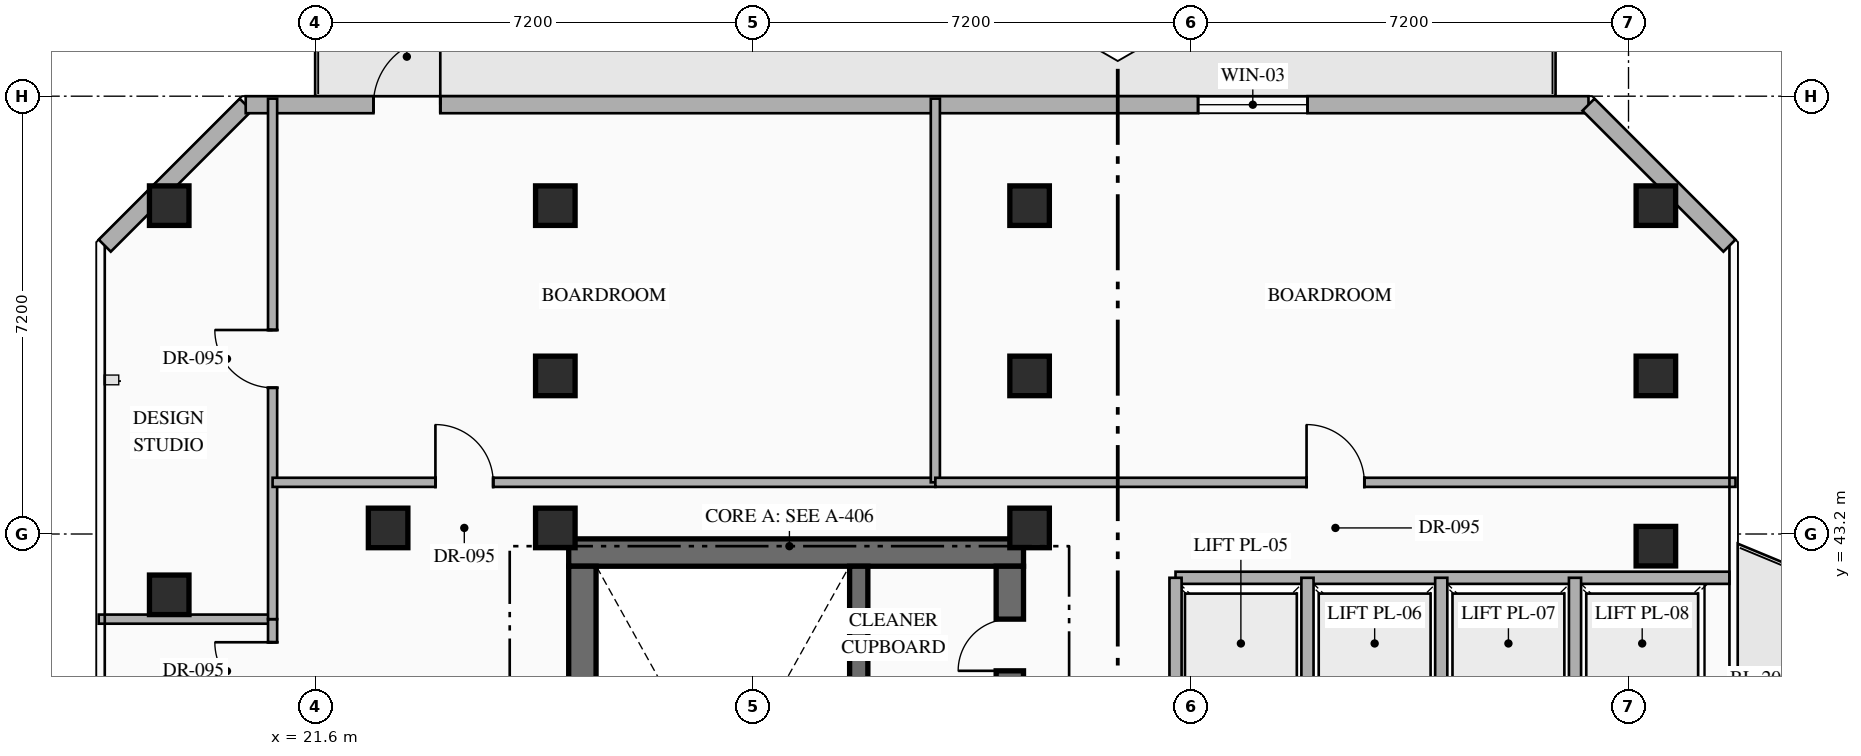
"""IFC4 building model, lengths in metres.
Left out: names, types, materials, properties, quantities, classifications, styles, units other than length and angle.
Written with IfcOpenShell. Run it as: python <this file> out.ifc"""

import sys

from ifc_helpers import new_model, si_unit, direction, frame, frame_2d, origin, origin_2d, place, context, subcontext, project, spatial, rectangle, hollow_rectangle, extrude, element, fill, save


model = new_model("IFC4")
c1 = context("Model", 3, precision=1e-05, world=origin(), true_north=direction((0.0, 1.0)))
c2 = subcontext(c1, "Body", "Model", "MODEL_VIEW")
j1 = project(units=[si_unit("LENGTHUNIT", "METRE"), si_unit("PLANEANGLEUNIT", "RADIAN")], contexts=[c1])
p1 = place(None, origin())
s1 = spatial("IfcSite", under=j1, at=p1, CompositionType="ELEMENT")
p2 = place(p1, origin())
s2 = spatial("IfcBuilding", under=s1, at=p2, CompositionType="ELEMENT")
p3 = place(p2, frame((0.0, 0.0, 243.15)))
s3 = spatial("IfcBuildingStorey", under=s2, at=p3, CompositionType="ELEMENT", Elevation=243.15)
p4 = place(p3, frame((25.77, 42.895, 0.0), z_axis=(0.0, 0.0, 1.0), x_axis=(1.0, 0.0, 0.0)))
e1 = element("IfcWall", 1, at=p4, inside=s3, PredefinedType="SHEAR", context=c2, shape_type="SweptSolid", body=[
    extrude(rectangle(XDim=7.48, YDim=0.45, at=frame_2d((3.74, 0.0))), origin(), (0.0, 0.0, 1.0), 3.6),
])
p5 = place(p3, frame((25.995, 33.19, 0.0), z_axis=(0.0, 0.0, 1.0), x_axis=(0.0, 1.0, 0.0)))
e2 = element("IfcWall", 2, at=p5, inside=s3, PredefinedType="SHEAR", context=c2, shape_type="SweptSolid", body=[
    extrude(rectangle(XDim=9.48, YDim=0.45, at=frame_2d((4.74, 0.0))), origin(), (0.0, 0.0, 1.0), 3.6),
])
p6 = place(p3, frame((33.025, 33.19, 0.0), z_axis=(0.0, 0.0, 1.0), x_axis=(0.0, 1.0, 0.0)))
e3 = element("IfcWall", 3, at=p6, inside=s3, PredefinedType="SHEAR", context=c2, shape_type="SweptSolid", body=[
    extrude(rectangle(XDim=9.48, YDim=0.45, at=frame_2d((4.74, 0.0))), origin(), (0.0, 0.0, 1.0), 3.6),
])
p7 = place(p6, frame((4.71, 0.0, 0.0)))
e4 = element("IfcOpeningElement", 4, at=p7, cuts=e3, PredefinedType="OPENING", context=c2, shape_type="SweptSolid", body=[
    extrude(rectangle(XDim=0.85, YDim=2.08, at=frame_2d((0.425, 1.04))), frame((0.0, 0.235, 0.0), z_axis=(0.0, -1.0, 0.0), x_axis=(1.0, 0.0, 0.0)), (0.0, 0.0, 1.0), 0.47),
])
p8 = place(p6, frame((7.76, 0.0, 0.0)))
e5 = element("IfcOpeningElement", 5, at=p8, cuts=e3, PredefinedType="OPENING", context=c2, shape_type="SweptSolid", body=[
    extrude(rectangle(XDim=0.85, YDim=2.08, at=frame_2d((0.425, 1.04))), frame((0.0, 0.235, 0.0), z_axis=(0.0, -1.0, 0.0), x_axis=(1.0, 0.0, 0.0)), (0.0, 0.0, 1.0), 0.47),
])
p9 = place(p3, frame((30.54, 33.19, 0.0), z_axis=(0.0, 0.0, 1.0), x_axis=(0.0, 1.0, 0.0)))
e6 = element("IfcWall", 6, at=p9, inside=s3, PredefinedType="SHEAR", context=c2, shape_type="SweptSolid", body=[
    extrude(rectangle(XDim=9.48, YDim=0.3, at=frame_2d((4.74, 0.0))), origin(), (0.0, 0.0, 1.0), 3.6),
])
for number, where, z_axis, x_axis in (
    (7, (25.55, 43.3, 0.0), (0.0, 0.0, 1.0), (1.0, 0.0, 0.0)),
    (8, (33.35, 43.3, 0.0), (0.0, 0.0, 1.0), (1.0, 0.0, 0.0)),
    (9, (43.65, 43.0, 0.0), (0.0, 0.0, 1.0), (1.0, 0.0, 0.0)),
    (10, (25.55, 45.8, 0.0), (0.0, 0.0, 1.0), (1.0, 0.0, 0.0)),
    (11, (33.35, 45.8, 0.0), (0.0, 0.0, 1.0), (1.0, 0.0, 0.0)),
    (12, (43.65, 45.8, 0.0), (0.0, 0.0, 1.0), (1.0, 0.0, 0.0)),
    (13, (19.2, 48.6, 0.0), (0.0, 0.0, 1.0), (1.0, 0.0, 0.0)),
    (14, (25.55, 48.6, 0.0), (0.0, 0.0, 1.0), (1.0, 0.0, 0.0)),
    (15, (33.35, 48.6, 0.0), (0.0, 0.0, 1.0), (1.0, 0.0, 0.0)),
    (16, (43.65, 48.6, 0.0), (0.0, 0.0, 1.0), (1.0, 0.0, 0.0)),
    (17, (19.2, 42.2, 0.0), (0.0, 0.0, 1.0), (1.0, 0.0, 0.0)),
    (18, (22.8, 43.3, 0.0), (0.0, 0.0, 1.0), (1.0, 0.0, 0.0)),
):
    element("IfcColumn", number, at=place(p3, frame(where, z_axis=z_axis, x_axis=x_axis)), inside=s3, PredefinedType="COLUMN", context=c2, shape_type="SweptSolid", body=[
        extrude(hollow_rectangle(XDim=0.65, YDim=0.65, WallThickness=0.025, at=origin_2d()), origin(), (0.0, 0.0, 1.0), 3.6),
    ])
p10 = place(p3, frame((18.14, 47.942, 0.0), z_axis=(0.0, 0.0, 1.0), x_axis=(0.707106781187, 0.707106781187, 0.0)))
e19 = element("IfcWall", 19, at=p10, inside=s3, PredefinedType="STANDARD", context=c2, shape_type="SweptSolid", body=[
    extrude(rectangle(XDim=3.278, YDim=0.28, at=frame_2d((1.639, 0.0))), origin(), (0.0, 0.0, 1.0), 3.35),
])
p11 = place(p3, frame((20.458, 50.26, 0.0), z_axis=(0.0, 0.0, 1.0), x_axis=(1.0, 0.0, 0.0)))
e20 = element("IfcWall", 20, at=p11, inside=s3, PredefinedType="STANDARD", context=c2, shape_type="SweptSolid", body=[
    extrude(rectangle(XDim=22.084, YDim=0.28, at=frame_2d((11.042, 0.0))), origin(), (0.0, 0.0, 1.0), 3.35),
])
p12 = place(p11, frame((2.1, 0.0, 0.0)))
e21 = element("IfcOpeningElement", 21, at=p12, cuts=e20, PredefinedType="OPENING", context=c2, shape_type="SweptSolid", body=[
    extrude(rectangle(XDim=1.1, YDim=2.2, at=frame_2d((0.55, 1.1))), frame((0.0, 0.15, 0.0), z_axis=(0.0, -1.0, 0.0), x_axis=(1.0, 0.0, 0.0)), (0.0, 0.0, 1.0), 0.3),
])
p13 = place(p11, frame((15.663, 0.0, 0.85)))
e22 = element("IfcOpeningElement", 22, at=p13, cuts=e20, PredefinedType="OPENING", context=c2, shape_type="SweptSolid", body=[
    extrude(rectangle(XDim=1.8, YDim=2.1, at=frame_2d((0.9, 1.05))), frame((0.0, 0.15, 0.0), z_axis=(0.0, -1.0, 0.0), x_axis=(1.0, 0.0, 0.0)), (0.0, 0.0, 1.0), 0.3),
])
p14 = place(p3, frame((42.542, 50.26, 0.0), z_axis=(0.0, 0.0, 1.0), x_axis=(0.707106781187, -0.707106781187, 0.0)))
e23 = element("IfcWall", 23, at=p14, inside=s3, PredefinedType="STANDARD", context=c2, shape_type="SweptSolid", body=[
    extrude(rectangle(XDim=3.278, YDim=0.28, at=frame_2d((1.639, 0.0))), origin(), (0.0, 0.0, 1.0), 3.35),
])
p15 = place(p3, frame((35.75, 42.48, 0.0), z_axis=(0.0, 0.0, 1.0), x_axis=(1.0, 0.0, 0.0)))
e24 = element("IfcWall", 24, at=p15, inside=s3, PredefinedType="STANDARD", context=c2, shape_type="SweptSolid", body=[
    extrude(rectangle(XDim=9.11, YDim=0.2, at=frame_2d((4.555, 0.0))), origin(), (0.0, 0.0, 1.0), 3.35),
])
for number, where, z_axis, x_axis in (
    (25, (35.75, 40.32, 0.0), (0.0, 0.0, 1.0), (0.0, 1.0, 0.0)),
    (26, (37.92, 40.32, 0.0), (0.0, 0.0, 1.0), (0.0, 1.0, 0.0)),
    (27, (40.12, 40.32, 0.0), (0.0, 0.0, 1.0), (0.0, 1.0, 0.0)),
    (28, (42.32, 40.32, 0.0), (0.0, 0.0, 1.0), (0.0, 1.0, 0.0)),
):
    element("IfcWall", number, at=place(p3, frame(where, z_axis=z_axis, x_axis=x_axis)), inside=s3, PredefinedType="STANDARD", context=c2, shape_type="SweptSolid", body=[
        extrude(rectangle(XDim=2.16, YDim=0.2, at=frame_2d((1.08, 0.0))), origin(), (0.0, 0.0, 1.0), 3.35),
    ])
p16 = place(p3, frame((18.04, 41.8, 0.0), z_axis=(0.0, 0.0, 1.0), x_axis=(1.0, 0.0, 0.0)))
e29 = element("IfcWall", 29, at=p16, inside=s3, PredefinedType="PARTITIONING", context=c2, shape_type="SweptSolid", body=[
    extrude(rectangle(XDim=2.86, YDim=0.15, at=frame_2d((1.43, 0.0))), origin(), (0.0, 0.0, 1.0), 3.35),
])
p17 = place(p3, frame((20.9, 31.6, 0.0), z_axis=(0.0, 0.0, 1.0), x_axis=(0.0, 1.0, 0.0)))
e30 = element("IfcWall", 30, at=p17, inside=s3, PredefinedType="PARTITIONING", context=c2, shape_type="SweptSolid", body=[
    extrude(rectangle(XDim=10.2, YDim=0.15, at=frame_2d((5.1, 0.0))), origin(), (0.0, 0.0, 1.0), 3.35),
])
p18 = place(p17, frame((8.87, 0.0, 0.0)))
e31 = element("IfcOpeningElement", 31, at=p18, cuts=e30, PredefinedType="OPENING", context=c2, shape_type="SweptSolid", body=[
    extrude(rectangle(XDim=0.95, YDim=2.15, at=frame_2d((0.475, 1.075))), frame((0.0, 0.085, 0.0), z_axis=(0.0, -1.0, 0.0), x_axis=(1.0, 0.0, 0.0)), (0.0, 0.0, 1.0), 0.17),
])
p19 = place(p3, frame((20.9, 41.8, 0.0), z_axis=(0.0, 0.0, 1.0), x_axis=(0.0, 1.0, 0.0)))
e32 = element("IfcWall", 32, at=p19, inside=s3, PredefinedType="PARTITIONING", context=c2, shape_type="SweptSolid", body=[
    extrude(rectangle(XDim=8.56, YDim=0.15, at=frame_2d((4.28, 0.0))), origin(), (0.0, 0.0, 1.0), 3.35),
])
p20 = place(p19, frame((3.805, 0.0, 0.0)))
e33 = element("IfcOpeningElement", 33, at=p20, cuts=e32, PredefinedType="OPENING", context=c2, shape_type="SweptSolid", body=[
    extrude(rectangle(XDim=0.95, YDim=2.15, at=frame_2d((0.475, 1.075))), frame((0.0, 0.085, 0.0), z_axis=(0.0, -1.0, 0.0), x_axis=(1.0, 0.0, 0.0)), (0.0, 0.0, 1.0), 0.17),
])
p21 = place(p3, frame((20.9, 44.05, 0.0), z_axis=(0.0, 0.0, 1.0), x_axis=(1.0, 0.0, 0.0)))
e34 = element("IfcWall", 34, at=p21, inside=s3, PredefinedType="PARTITIONING", context=c2, shape_type="SweptSolid", body=[
    extrude(rectangle(XDim=10.9, YDim=0.15, at=frame_2d((5.45, 0.0))), origin(), (0.0, 0.0, 1.0), 3.35),
])
p22 = place(p21, frame((2.678, 0.0, 0.0)))
e35 = element("IfcOpeningElement", 35, at=p22, cuts=e34, PredefinedType="OPENING", context=c2, shape_type="SweptSolid", body=[
    extrude(rectangle(XDim=0.95, YDim=2.15, at=frame_2d((0.475, 1.075))), frame((0.0, 0.085, 0.0), z_axis=(0.0, -1.0, 0.0), x_axis=(1.0, 0.0, 0.0)), (0.0, 0.0, 1.0), 0.17),
])
p23 = place(p3, frame((31.8, 44.05, 0.0), z_axis=(0.0, 0.0, 1.0), x_axis=(0.0, 1.0, 0.0)))
e36 = element("IfcWall", 36, at=p23, inside=s3, PredefinedType="PARTITIONING", context=c2, shape_type="SweptSolid", body=[
    extrude(rectangle(XDim=6.31, YDim=0.15, at=frame_2d((3.155, 0.0))), origin(), (0.0, 0.0, 1.0), 3.35),
])
p24 = place(p3, frame((31.8, 44.05, 0.0), z_axis=(0.0, 0.0, 1.0), x_axis=(1.0, 0.0, 0.0)))
e37 = element("IfcWall", 37, at=p24, inside=s3, PredefinedType="PARTITIONING", context=c2, shape_type="SweptSolid", body=[
    extrude(rectangle(XDim=13.16, YDim=0.15, at=frame_2d((6.58, 0.0))), origin(), (0.0, 0.0, 1.0), 3.35),
])
p25 = place(p24, frame((6.105, 0.0, 0.0)))
e38 = element("IfcOpeningElement", 38, at=p25, cuts=e37, PredefinedType="OPENING", context=c2, shape_type="SweptSolid", body=[
    extrude(rectangle(XDim=0.95, YDim=2.15, at=frame_2d((0.475, 1.075))), frame((0.0, 0.085, 0.0), z_axis=(0.0, -1.0, 0.0), x_axis=(1.0, 0.0, 0.0)), (0.0, 0.0, 1.0), 0.17),
])
p26 = place(p12, origin())
e39 = element("IfcDoor", 39, at=p26, inside=s3, OperationType="SINGLE_SWING_RIGHT", PredefinedType="DOOR", context=c2, shape_type="SweptSolid", body=[
    extrude(rectangle(XDim=1.1, YDim=2.2, at=frame_2d((0.55, 1.1))), frame((0.0, 0.025, 0.0), z_axis=(0.0, -1.0, 0.0), x_axis=(1.0, 0.0, 0.0)), (0.0, 0.0, 1.0), 0.05),
])
fill(e21, e39)
p27 = place(p13, origin())
e40 = element("IfcWindow", 40, at=p27, inside=s3, PartitioningType="SINGLE_PANEL", PredefinedType="WINDOW", context=c2, shape_type="SweptSolid", body=[
    extrude(rectangle(XDim=1.8, YDim=2.1, at=frame_2d((0.9, 1.05))), frame((0.0, 0.03, 0.0), z_axis=(0.0, -1.0, 0.0), x_axis=(1.0, 0.0, 0.0)), (0.0, 0.0, 1.0), 0.06),
])
fill(e22, e40)
p28 = place(p8, origin())
e41 = element("IfcDoor", 41, at=p28, inside=s3, OperationType="SINGLE_SWING_LEFT", PredefinedType="DOOR", context=c2, shape_type="SweptSolid", body=[
    extrude(rectangle(XDim=0.85, YDim=2.08, at=frame_2d((0.425, 1.04))), frame((0.0, 0.025, 0.0), z_axis=(0.0, -1.0, 0.0), x_axis=(1.0, 0.0, 0.0)), (0.0, 0.0, 1.0), 0.05),
])
fill(e5, e41)
p29 = place(p18, origin())
e42 = element("IfcDoor", 42, at=p29, inside=s3, OperationType="SINGLE_SWING_RIGHT", PredefinedType="DOOR", context=c2, shape_type="SweptSolid", body=[
    extrude(rectangle(XDim=0.95, YDim=2.15, at=frame_2d((0.475, 1.075))), frame((0.0, 0.025, 0.0), z_axis=(0.0, -1.0, 0.0), x_axis=(1.0, 0.0, 0.0)), (0.0, 0.0, 1.0), 0.05),
])
fill(e31, e42)
p30 = place(p20, origin())
e43 = element("IfcDoor", 43, at=p30, inside=s3, OperationType="SINGLE_SWING_RIGHT", PredefinedType="DOOR", context=c2, shape_type="SweptSolid", body=[
    extrude(rectangle(XDim=0.95, YDim=2.15, at=frame_2d((0.475, 1.075))), frame((0.0, 0.025, 0.0), z_axis=(0.0, -1.0, 0.0), x_axis=(1.0, 0.0, 0.0)), (0.0, 0.0, 1.0), 0.05),
])
fill(e33, e43)
p31 = place(p22, origin())
e44 = element("IfcDoor", 44, at=p31, inside=s3, OperationType="SINGLE_SWING_LEFT", PredefinedType="DOOR", context=c2, shape_type="SweptSolid", body=[
    extrude(rectangle(XDim=0.95, YDim=2.15, at=frame_2d((0.475, 1.075))), frame((0.0, 0.025, 0.0), z_axis=(0.0, -1.0, 0.0), x_axis=(1.0, 0.0, 0.0)), (0.0, 0.0, 1.0), 0.05),
])
fill(e35, e44)
p32 = place(p25, origin())
e45 = element("IfcDoor", 45, at=p32, inside=s3, OperationType="SINGLE_SWING_LEFT", PredefinedType="DOOR", context=c2, shape_type="SweptSolid", body=[
    extrude(rectangle(XDim=0.95, YDim=2.15, at=frame_2d((0.475, 1.075))), frame((0.0, 0.025, 0.0), z_axis=(0.0, -1.0, 0.0), x_axis=(1.0, 0.0, 0.0)), (0.0, 0.0, 1.0), 0.05),
])
fill(e38, e45)
save(model, sys.argv[1])
